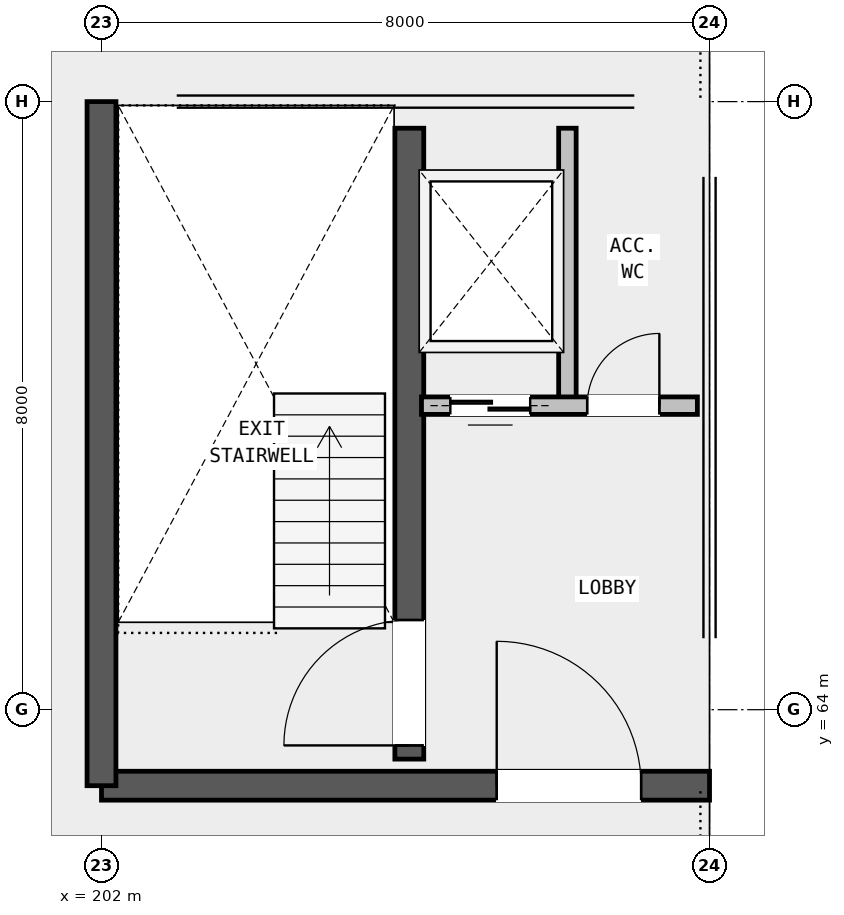
"""IFC4 building model, lengths in metres.
Left out: names, types, materials, properties, quantities, classifications, styles, units other than length and angle.
Written with IfcOpenShell. Run it as: python <this file> out.ifc"""

import sys

from ifc_helpers import new_model, si_unit, direction, frame, frame_2d, origin, place, context, subcontext, project, spatial, rectangle, extrude, element, fill, save


model = new_model("IFC4")
c1 = context("Model", 3, precision=1e-05, world=origin(), true_north=direction((0.0, 1.0)))
c2 = subcontext(c1, "Body", "Model", "MODEL_VIEW")
j1 = project(units=[si_unit("LENGTHUNIT", "METRE"), si_unit("PLANEANGLEUNIT", "RADIAN")], contexts=[c1])
p1 = place(None, origin())
s1 = spatial("IfcSite", under=j1, at=p1, CompositionType="ELEMENT")
p2 = place(p1, origin())
s2 = spatial("IfcBuilding", under=s1, at=p2, CompositionType="ELEMENT")
p3 = place(p2, frame((0.0, 0.0, 17.3)))
s3 = spatial("IfcBuildingStorey", under=s2, at=p3, CompositionType="ELEMENT", Elevation=17.3)
p4 = place(p3, frame((202.0, 63.0, 0.0), z_axis=(0.0, 0.0, 1.0), x_axis=(1.0, 0.0, 0.0)))
e1 = element("IfcWall", 1, at=p4, inside=s3, PredefinedType="SHEAR", context=c2, shape_type="SweptSolid", body=[
    extrude(rectangle(XDim=8.0, YDim=0.38, at=frame_2d((4.0, 0.0))), origin(), (0.0, 0.0, 1.0), 2.4),
])
p5 = place(p4, frame((5.2, 0.0, 0.0)))
e2 = element("IfcOpeningElement", 2, at=p5, cuts=e1, PredefinedType="OPENING", context=c2, shape_type="SweptSolid", body=[
    extrude(rectangle(XDim=1.9, YDim=2.3, at=frame_2d((0.95, 1.15))), frame((0.0, 0.2, 0.0), z_axis=(0.0, -1.0, 0.0), x_axis=(1.0, 0.0, 0.0)), (0.0, 0.0, 1.0), 0.4),
])
p6 = place(p3, frame((202.0, 72.0, 0.0), z_axis=(0.0, 0.0, 1.0), x_axis=(0.0, -1.0, 0.0)))
e3 = element("IfcWall", 3, at=p6, inside=s3, PredefinedType="SHEAR", context=c2, shape_type="SweptSolid", body=[
    extrude(rectangle(XDim=9.0, YDim=0.38, at=frame_2d((4.5, 0.0))), origin(), (0.0, 0.0, 1.0), 2.4),
])
p7 = place(p3, frame((206.05, 63.35, 0.0), z_axis=(0.0, 0.0, 1.0), x_axis=(0.0, 1.0, 0.0)))
e4 = element("IfcWall", 4, at=p7, inside=s3, PredefinedType="SHEAR", context=c2, shape_type="SweptSolid", body=[
    extrude(rectangle(XDim=8.3, YDim=0.38, at=frame_2d((4.15, 0.0))), origin(), (0.0, 0.0, 1.0), 2.4),
])
p8 = place(p7, frame((0.18, 0.0, 0.0)))
e5 = element("IfcOpeningElement", 5, at=p8, cuts=e4, PredefinedType="OPENING", context=c2, shape_type="SweptSolid", body=[
    extrude(rectangle(XDim=1.65, YDim=2.2, at=frame_2d((0.825, 1.1))), frame((0.0, 0.2, 0.0), z_axis=(0.0, -1.0, 0.0), x_axis=(1.0, 0.0, 0.0)), (0.0, 0.0, 1.0), 0.4),
])
p9 = place(p3, frame((208.13, 68.0, 0.0), z_axis=(0.0, 0.0, 1.0), x_axis=(0.0, 1.0, 0.0)))
e6 = element("IfcWall", 6, at=p9, inside=s3, PredefinedType="PARTITIONING", context=c2, shape_type="SweptSolid", body=[
    extrude(rectangle(XDim=3.65, YDim=0.23, at=frame_2d((1.825, 0.0))), origin(), (0.0, 0.0, 1.0), 2.4),
])
p10 = place(p3, frame((206.21, 68.0, 0.0), z_axis=(0.0, 0.0, 1.0), x_axis=(1.0, 0.0, 0.0)))
e7 = element("IfcWall", 7, at=p10, inside=s3, PredefinedType="PARTITIONING", context=c2, shape_type="SweptSolid", body=[
    extrude(rectangle(XDim=3.63, YDim=0.23, at=frame_2d((1.815, 0.0))), origin(), (0.0, 0.0, 1.0), 2.4),
])
p11 = place(p10, frame((0.38, 0.0, 0.0)))
e8 = element("IfcOpeningElement", 8, at=p11, cuts=e7, PredefinedType="OPENING", context=c2, shape_type="SweptSolid", body=[
    extrude(rectangle(XDim=1.05, YDim=2.15, at=frame_2d((0.525, 1.075))), frame((0.0, 0.125, 0.0), z_axis=(0.0, -1.0, 0.0), x_axis=(1.0, 0.0, 0.0)), (0.0, 0.0, 1.0), 0.25),
])
p12 = place(p10, frame((2.18, 0.0, 0.0)))
e9 = element("IfcOpeningElement", 9, at=p12, cuts=e7, PredefinedType="OPENING", context=c2, shape_type="SweptSolid", body=[
    extrude(rectangle(XDim=0.95, YDim=2.1, at=frame_2d((0.475, 1.05))), frame((0.0, 0.125, 0.0), z_axis=(0.0, -1.0, 0.0), x_axis=(1.0, 0.0, 0.0)), (0.0, 0.0, 1.0), 0.25),
])
p13 = place(p5, origin())
e10 = element("IfcDoor", 10, at=p13, inside=s3, OperationType="SINGLE_SWING_LEFT", PredefinedType="DOOR", context=c2, shape_type="SweptSolid", body=[
    extrude(rectangle(XDim=1.9, YDim=2.3, at=frame_2d((0.95, 1.15))), frame((0.0, 0.025, 0.0), z_axis=(0.0, -1.0, 0.0), x_axis=(1.0, 0.0, 0.0)), (0.0, 0.0, 1.0), 0.05),
])
fill(e2, e10)
p14 = place(p8, origin())
e11 = element("IfcDoor", 11, at=p14, inside=s3, OperationType="SINGLE_SWING_LEFT", PredefinedType="DOOR", context=c2, shape_type="SweptSolid", body=[
    extrude(rectangle(XDim=1.65, YDim=2.2, at=frame_2d((0.825, 1.1))), frame((0.0, 0.025, 0.0), z_axis=(0.0, -1.0, 0.0), x_axis=(1.0, 0.0, 0.0)), (0.0, 0.0, 1.0), 0.05),
])
fill(e5, e11)
p15 = place(p11, origin())
e12 = element("IfcDoor", 12, at=p15, inside=s3, OperationType="SLIDING_TO_LEFT", PredefinedType="DOOR", context=c2, shape_type="SweptSolid", body=[
    extrude(rectangle(XDim=1.05, YDim=2.15, at=frame_2d((0.525, 1.075))), frame((0.0, 0.025, 0.0), z_axis=(0.0, -1.0, 0.0), x_axis=(1.0, 0.0, 0.0)), (0.0, 0.0, 1.0), 0.05),
])
fill(e8, e12)
p16 = place(p12, origin())
e13 = element("IfcDoor", 13, at=p16, inside=s3, OperationType="SINGLE_SWING_RIGHT", PredefinedType="DOOR", context=c2, shape_type="SweptSolid", body=[
    extrude(rectangle(XDim=0.95, YDim=2.1, at=frame_2d((0.475, 1.05))), frame((0.0, 0.025, 0.0), z_axis=(0.0, -1.0, 0.0), x_axis=(1.0, 0.0, 0.0)), (0.0, 0.0, 1.0), 0.05),
])
fill(e9, e13)
save(model, sys.argv[1])
